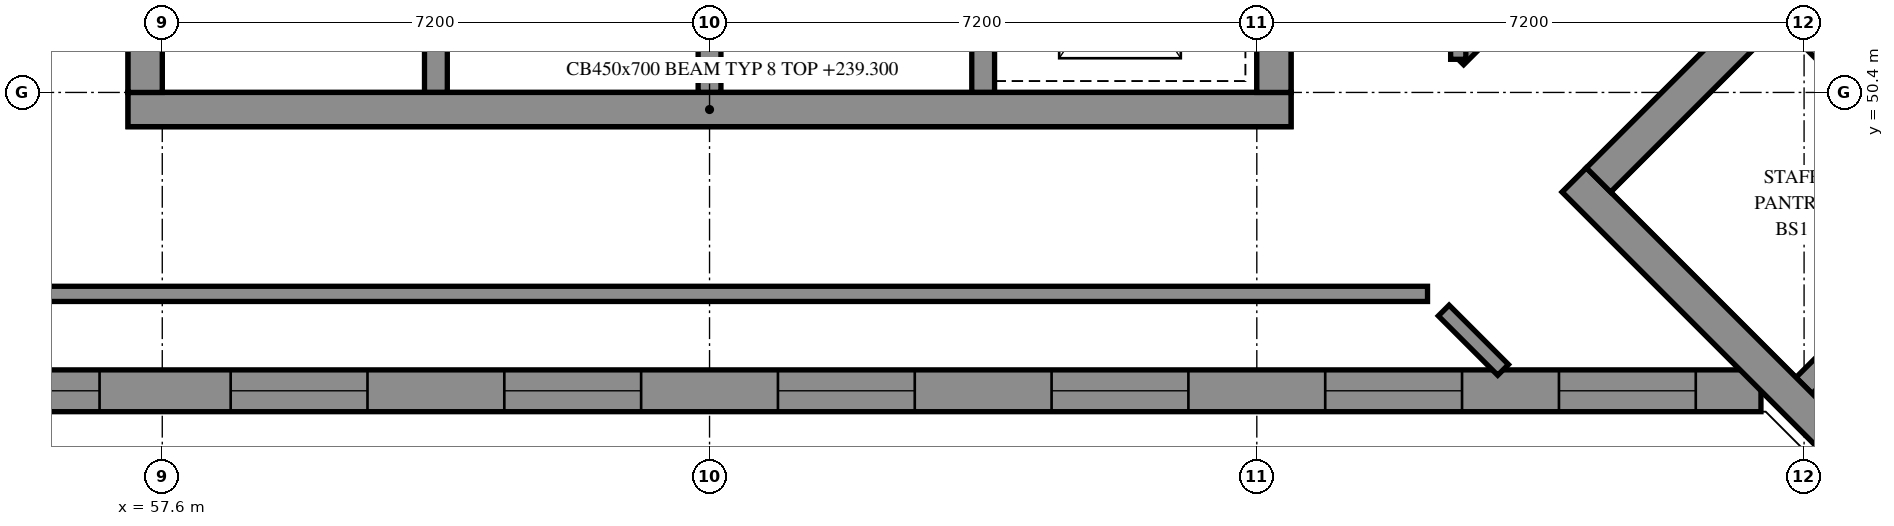
"""IFC4 building model, lengths in metres.
Left out: names, types, materials, properties, quantities, classifications, styles, units other than length and angle.
Written with IfcOpenShell. Run it as: python <this file> out.ifc"""

import sys

from ifc_helpers import new_model, si_unit, direction, frame, frame_2d, origin, place, context, subcontext, project, spatial, polyline, rectangle, outline, extrude, element, fill, save


model = new_model("IFC4")
c1 = context("Model", 3, precision=1e-05, world=origin(), true_north=direction((0.0, 1.0)))
c2 = subcontext(c1, "Body", "Model", "MODEL_VIEW")
j1 = project(units=[si_unit("LENGTHUNIT", "METRE"), si_unit("PLANEANGLEUNIT", "RADIAN")], contexts=[c1])
p1 = place(None, origin())
s1 = spatial("IfcSite", under=j1, at=p1, CompositionType="ELEMENT")
p2 = place(p1, origin())
s2 = spatial("IfcBuilding", under=s1, at=p2, CompositionType="ELEMENT")
p3 = place(p2, frame((0.0, 0.0, 234.6)))
s3 = spatial("IfcBuildingStorey", under=s2, at=p3, CompositionType="ELEMENT", Elevation=234.6)
p4 = place(p3, frame((57.15, 50.175, -0.3), z_axis=(0.0, 0.0, 1.0), x_axis=(1.0, 0.0, 0.0)))
e1 = element("IfcWall", 1, at=p4, inside=s3, PredefinedType="SHEAR", context=c2, shape_type="SweptSolid", body=[
    extrude(rectangle(XDim=15.3, YDim=0.45, at=frame_2d((7.65, 0.0))), origin(), (0.0, 0.0, 1.0), 4.3),
])
p5 = place(p3, frame((57.375, 50.4, -0.3), z_axis=(0.0, 0.0, 1.0), x_axis=(0.0, 1.0, 0.0)))
e2 = element("IfcWall", 2, at=p5, inside=s3, PredefinedType="SHEAR", context=c2, shape_type="SweptSolid", body=[
    extrude(rectangle(XDim=14.4, YDim=0.45, at=frame_2d((7.2, 0.0))), origin(), (0.0, 0.0, 1.0), 4.3),
])
p6 = place(p5, frame((4.55, 0.0, 0.3)))
e3 = element("IfcOpeningElement", 3, at=p6, cuts=e2, PredefinedType="OPENING", context=c2, shape_type="SweptSolid", body=[
    extrude(rectangle(XDim=1.1, YDim=2.1, at=frame_2d((0.55, 1.05))), frame((0.0, 0.235, 0.0), z_axis=(0.0, -1.0, 0.0), x_axis=(1.0, 0.0, 0.0)), (0.0, 0.0, 1.0), 0.47),
])
p7 = place(p5, frame((11.35, 0.0, 0.3)))
e4 = element("IfcOpeningElement", 4, at=p7, cuts=e2, PredefinedType="OPENING", context=c2, shape_type="SweptSolid", body=[
    extrude(rectangle(XDim=1.1, YDim=2.1, at=frame_2d((0.55, 1.05))), frame((0.0, 0.235, 0.0), z_axis=(0.0, -1.0, 0.0), x_axis=(1.0, 0.0, 0.0)), (0.0, 0.0, 1.0), 0.47),
])
p8 = place(p3, frame((72.225, 50.4, -0.3), z_axis=(0.0, 0.0, 1.0), x_axis=(0.0, 1.0, 0.0)))
e5 = element("IfcWall", 5, at=p8, inside=s3, PredefinedType="SHEAR", context=c2, shape_type="SweptSolid", body=[
    extrude(rectangle(XDim=14.4, YDim=0.45, at=frame_2d((7.2, 0.0))), origin(), (0.0, 0.0, 1.0), 4.3),
])
p9 = place(p8, frame((4.55, 0.0, 0.3)))
e6 = element("IfcOpeningElement", 6, at=p9, cuts=e5, PredefinedType="OPENING", context=c2, shape_type="SweptSolid", body=[
    extrude(rectangle(XDim=1.1, YDim=2.1, at=frame_2d((0.55, 1.05))), frame((0.0, 0.235, 0.0), z_axis=(0.0, -1.0, 0.0), x_axis=(1.0, 0.0, 0.0)), (0.0, 0.0, 1.0), 0.47),
])
p10 = place(p8, frame((11.35, 0.0, 0.3)))
e7 = element("IfcOpeningElement", 7, at=p10, cuts=e5, PredefinedType="OPENING", context=c2, shape_type="SweptSolid", body=[
    extrude(rectangle(XDim=1.1, YDim=2.1, at=frame_2d((0.55, 1.05))), frame((0.0, 0.235, 0.0), z_axis=(0.0, -1.0, 0.0), x_axis=(1.0, 0.0, 0.0)), (0.0, 0.0, 1.0), 0.47),
])
for number, where, z_axis, x_axis in (
    (8, (61.2, 50.4, 0.0), (0.0, 0.0, 1.0), (0.0, 1.0, 0.0)),
    (9, (64.8, 50.4, 0.0), (0.0, 0.0, 1.0), (0.0, 1.0, 0.0)),
    (10, (68.4, 50.4, 0.0), (0.0, 0.0, 1.0), (0.0, 1.0, 0.0)),
):
    element("IfcWall", number, at=place(p3, frame(where, z_axis=z_axis, x_axis=x_axis)), inside=s3, PredefinedType="SOLIDWALL", context=c2, shape_type="SweptSolid", body=[
        extrude(rectangle(XDim=3.3, YDim=0.3, at=frame_2d((1.65, 0.0))), origin(), (0.0, 0.0, 1.0), 4.7),
    ])
p11 = place(p3, frame((76.177, 49.249, -0.3), z_axis=(0.0, 0.0, 1.0), x_axis=(0.7071100491, -0.7071035132, 0.0)))
e11 = element("IfcWall", 11, at=p11, inside=s3, PredefinedType="SHEAR", context=c2, shape_type="SweptSolid", body=[
    extrude(rectangle(XDim=15.3, YDim=0.45, at=frame_2d((7.65, 0.0))), origin(), (0.0, 0.0, 1.0), 4.3),
])
p12 = place(p3, frame((76.495, 49.249, -0.3), z_axis=(0.0, 0.0, 1.0), x_axis=(0.7071067812, 0.7071067812, 0.0)))
e12 = element("IfcWall", 12, at=p12, inside=s3, PredefinedType="SHEAR", context=c2, shape_type="SweptSolid", body=[
    extrude(rectangle(XDim=14.4, YDim=0.45, at=frame_2d((7.2, 0.0))), origin(), (0.0, 0.0, 1.0), 4.3),
])
p13 = place(p12, frame((4.55, 0.0, 0.3)))
e13 = element("IfcOpeningElement", 13, at=p13, cuts=e12, PredefinedType="OPENING", context=c2, shape_type="SweptSolid", body=[
    extrude(rectangle(XDim=1.1, YDim=2.1, at=frame_2d((0.55, 1.05))), frame((0.0, 0.235, 0.0), z_axis=(0.0, -1.0, 0.0), x_axis=(1.0, 0.0, 0.0)), (0.0, 0.0, 1.0), 0.47),
])
p14 = place(p12, frame((11.35, 0.0, 0.3)))
e14 = element("IfcOpeningElement", 14, at=p14, cuts=e12, PredefinedType="OPENING", context=c2, shape_type="SweptSolid", body=[
    extrude(rectangle(XDim=1.1, YDim=2.1, at=frame_2d((0.55, 1.05))), frame((0.0, 0.235, 0.0), z_axis=(0.0, -1.0, 0.0), x_axis=(1.0, 0.0, 0.0)), (0.0, 0.0, 1.0), 0.47),
])
p15 = place(p3, frame((79.2, 46.544, 0.0), z_axis=(0.0, 0.0, 1.0), x_axis=(0.7071219326, 0.7070916295, 0.0)))
e15 = element("IfcWall", 15, at=p15, inside=s3, PredefinedType="SOLIDWALL", context=c2, shape_type="SweptSolid", body=[
    extrude(rectangle(XDim=3.3, YDim=0.3, at=frame_2d((1.65, 0.0))), origin(), (0.0, 0.0, 1.0), 4.7),
])
p16 = place(p3, frame((78.988, 51.423, 0.0), z_axis=(0.0, 0.0, 1.0), x_axis=(0.7071067812, -0.7071067812, 0.0)))
e16 = element("IfcWall", 16, at=p16, inside=s3, PredefinedType="SOLIDWALL", context=c2, shape_type="SweptSolid", body=[
    extrude(rectangle(XDim=14.4, YDim=0.3, at=frame_2d((7.2, 0.0))), origin(), (0.0, 0.0, 1.0), 4.7),
])
p17 = place(p16, frame((1.35, 0.0, 0.0)))
e17 = element("IfcOpeningElement", 17, at=p17, cuts=e16, PredefinedType="OPENING", context=c2, shape_type="SweptSolid", body=[
    extrude(rectangle(XDim=0.9, YDim=2.1, at=frame_2d((0.45, 1.05))), frame((0.0, 0.16, 0.0), z_axis=(0.0, -1.0, 0.0), x_axis=(1.0, 0.0, 0.0)), (0.0, 0.0, 1.0), 0.32),
])
p18 = place(p16, frame((4.95, 0.0, 0.0)))
e18 = element("IfcOpeningElement", 18, at=p18, cuts=e16, PredefinedType="OPENING", context=c2, shape_type="SweptSolid", body=[
    extrude(rectangle(XDim=0.9, YDim=2.1, at=frame_2d((0.45, 1.05))), frame((0.0, 0.16, 0.0), z_axis=(0.0, -1.0, 0.0), x_axis=(1.0, 0.0, 0.0)), (0.0, 0.0, 1.0), 0.32),
])
p19 = place(p16, frame((8.55, 0.0, 0.0)))
e19 = element("IfcOpeningElement", 19, at=p19, cuts=e16, PredefinedType="OPENING", context=c2, shape_type="SweptSolid", body=[
    extrude(rectangle(XDim=0.9, YDim=2.1, at=frame_2d((0.45, 1.05))), frame((0.0, 0.16, 0.0), z_axis=(0.0, -1.0, 0.0), x_axis=(1.0, 0.0, 0.0)), (0.0, 0.0, 1.0), 0.32),
])
p20 = place(p16, frame((12.05, 0.0, 0.0)))
e20 = element("IfcOpeningElement", 20, at=p20, cuts=e16, PredefinedType="OPENING", context=c2, shape_type="SweptSolid", body=[
    extrude(rectangle(XDim=1.1, YDim=2.1, at=frame_2d((0.55, 1.05))), frame((0.0, 0.16, 0.0), z_axis=(0.0, -1.0, 0.0), x_axis=(1.0, 0.0, 0.0)), (0.0, 0.0, 1.0), 0.32),
])
p21 = place(p3, frame((53.675, 46.475, 0.0), z_axis=(0.0, 0.0, 1.0), x_axis=(1.0, 0.0, 0.0)))
e21 = element("IfcWall", 21, at=p21, inside=s3, PredefinedType="SOLIDWALL", context=c2, shape_type="SweptSolid", body=[
    extrude(outline(polyline([(-0.275, -0.275), (24.958, -0.275), (24.958, 0.275), (0.275, 0.275), (-0.275, -0.275)])), origin(), (0.0, 0.0, 1.0), 4.7),
])
p22 = place(p21, frame((1.3, 0.0, 0.9)))
e22 = element("IfcOpeningElement", 22, at=p22, cuts=e21, PredefinedType="OPENING", context=c2, shape_type="SweptSolid", body=[
    extrude(rectangle(XDim=1.8, YDim=3.6, at=frame_2d((0.9, 1.8))), frame((0.0, 0.285, 0.0), z_axis=(0.0, -1.0, 0.0), x_axis=(1.0, 0.0, 0.0)), (0.0, 0.0, 1.0), 0.57),
])
p23 = place(p21, frame((4.825, 0.0, 0.9)))
e23 = element("IfcOpeningElement", 23, at=p23, cuts=e21, PredefinedType="OPENING", context=c2, shape_type="SweptSolid", body=[
    extrude(rectangle(XDim=1.8, YDim=3.6, at=frame_2d((0.9, 1.8))), frame((0.0, 0.285, 0.0), z_axis=(0.0, -1.0, 0.0), x_axis=(1.0, 0.0, 0.0)), (0.0, 0.0, 1.0), 0.57),
])
p24 = place(p21, frame((8.425, 0.0, 0.9)))
e24 = element("IfcOpeningElement", 24, at=p24, cuts=e21, PredefinedType="OPENING", context=c2, shape_type="SweptSolid", body=[
    extrude(rectangle(XDim=1.8, YDim=3.6, at=frame_2d((0.9, 1.8))), frame((0.0, 0.285, 0.0), z_axis=(0.0, -1.0, 0.0), x_axis=(1.0, 0.0, 0.0)), (0.0, 0.0, 1.0), 0.57),
])
p25 = place(p21, frame((12.025, 0.0, 0.9)))
e25 = element("IfcOpeningElement", 25, at=p25, cuts=e21, PredefinedType="OPENING", context=c2, shape_type="SweptSolid", body=[
    extrude(rectangle(XDim=1.8, YDim=3.6, at=frame_2d((0.9, 1.8))), frame((0.0, 0.285, 0.0), z_axis=(0.0, -1.0, 0.0), x_axis=(1.0, 0.0, 0.0)), (0.0, 0.0, 1.0), 0.57),
])
p26 = place(p21, frame((15.625, 0.0, 0.9)))
e26 = element("IfcOpeningElement", 26, at=p26, cuts=e21, PredefinedType="OPENING", context=c2, shape_type="SweptSolid", body=[
    extrude(rectangle(XDim=1.8, YDim=3.6, at=frame_2d((0.9, 1.8))), frame((0.0, 0.285, 0.0), z_axis=(0.0, -1.0, 0.0), x_axis=(1.0, 0.0, 0.0)), (0.0, 0.0, 1.0), 0.57),
])
p27 = place(p21, frame((19.225, 0.0, 0.9)))
e27 = element("IfcOpeningElement", 27, at=p27, cuts=e21, PredefinedType="OPENING", context=c2, shape_type="SweptSolid", body=[
    extrude(rectangle(XDim=1.8, YDim=3.6, at=frame_2d((0.9, 1.8))), frame((0.0, 0.285, 0.0), z_axis=(0.0, -1.0, 0.0), x_axis=(1.0, 0.0, 0.0)), (0.0, 0.0, 1.0), 0.57),
])
p28 = place(p21, frame((22.3, 0.0, 0.9)))
e28 = element("IfcOpeningElement", 28, at=p28, cuts=e21, PredefinedType="OPENING", context=c2, shape_type="SweptSolid", body=[
    extrude(rectangle(XDim=1.8, YDim=3.6, at=frame_2d((0.9, 1.8))), frame((0.0, 0.285, 0.0), z_axis=(0.0, -1.0, 0.0), x_axis=(1.0, 0.0, 0.0)), (0.0, 0.0, 1.0), 0.57),
])
p29 = place(p3, frame((54.95, 47.75, 0.0), z_axis=(0.0, 0.0, 1.0), x_axis=(1.0, 0.0, 0.0)))
e29 = element("IfcWall", 29, at=p29, inside=s3, PredefinedType="PARTITIONING", context=c2, shape_type="SweptSolid", body=[
    extrude(rectangle(XDim=19.296, YDim=0.2, at=frame_2d((9.648, 0.0))), origin(), (0.0, 0.0, 1.0), 4.7),
])
p30 = place(p3, frame((74.651, 50.835, 0.0), z_axis=(0.0, 0.0, 1.0), x_axis=(0.7071067812, 0.7071067812, 0.0)))
e30 = element("IfcWall", 30, at=p30, inside=s3, PredefinedType="PARTITIONING", context=c2, shape_type="SweptSolid", body=[
    extrude(rectangle(XDim=2.919, YDim=0.2, at=frame_2d((1.459, 0.0))), origin(), (0.0, 0.0, 1.0), 4.7),
])
p31 = place(p3, frame((74.65, 50.836, 0.0), z_axis=(0.0, 0.0, 1.0), x_axis=(0.0, 1.0, 0.0)))
e31 = element("IfcWall", 31, at=p31, inside=s3, PredefinedType="PARTITIONING", context=c2, shape_type="SweptSolid", body=[
    extrude(rectangle(XDim=2.064, YDim=0.2, at=frame_2d((1.032, 0.0))), origin(), (0.0, 0.0, 1.0), 4.7),
])
p32 = place(p3, frame((74.459, 47.531, 0.0), z_axis=(0.0, 0.0, 1.0), x_axis=(0.7071520462, -0.7070615133, 0.0)))
e32 = element("IfcWall", 32, at=p32, inside=s3, PredefinedType="PARTITIONING", context=c2, shape_type="SweptSolid", body=[
    extrude(rectangle(XDim=1.105, YDim=0.2, at=frame_2d((0.552, 0.0))), origin(), (0.0, 0.0, 1.0), 4.7),
])
p33 = place(p22, origin())
e33 = element("IfcWindow", 33, at=p33, inside=s3, PartitioningType="SINGLE_PANEL", PredefinedType="WINDOW", context=c2, shape_type="SweptSolid", body=[
    extrude(rectangle(XDim=1.8, YDim=3.6, at=frame_2d((0.9, 1.8))), frame((0.0, 0.155, 0.0), z_axis=(0.0, -1.0, 0.0), x_axis=(1.0, 0.0, 0.0)), (0.0, 0.0, 1.0), 0.06),
])
fill(e22, e33)
p34 = place(p23, origin())
e34 = element("IfcWindow", 34, at=p34, inside=s3, PartitioningType="SINGLE_PANEL", PredefinedType="WINDOW", context=c2, shape_type="SweptSolid", body=[
    extrude(rectangle(XDim=1.8, YDim=3.6, at=frame_2d((0.9, 1.8))), frame((0.0, 0.155, 0.0), z_axis=(0.0, -1.0, 0.0), x_axis=(1.0, 0.0, 0.0)), (0.0, 0.0, 1.0), 0.06),
])
fill(e23, e34)
p35 = place(p24, origin())
e35 = element("IfcWindow", 35, at=p35, inside=s3, PartitioningType="SINGLE_PANEL", PredefinedType="WINDOW", context=c2, shape_type="SweptSolid", body=[
    extrude(rectangle(XDim=1.8, YDim=3.6, at=frame_2d((0.9, 1.8))), frame((0.0, 0.155, 0.0), z_axis=(0.0, -1.0, 0.0), x_axis=(1.0, 0.0, 0.0)), (0.0, 0.0, 1.0), 0.06),
])
fill(e24, e35)
p36 = place(p25, origin())
e36 = element("IfcWindow", 36, at=p36, inside=s3, PartitioningType="SINGLE_PANEL", PredefinedType="WINDOW", context=c2, shape_type="SweptSolid", body=[
    extrude(rectangle(XDim=1.8, YDim=3.6, at=frame_2d((0.9, 1.8))), frame((0.0, 0.155, 0.0), z_axis=(0.0, -1.0, 0.0), x_axis=(1.0, 0.0, 0.0)), (0.0, 0.0, 1.0), 0.06),
])
fill(e25, e36)
p37 = place(p26, origin())
e37 = element("IfcWindow", 37, at=p37, inside=s3, PartitioningType="SINGLE_PANEL", PredefinedType="WINDOW", context=c2, shape_type="SweptSolid", body=[
    extrude(rectangle(XDim=1.8, YDim=3.6, at=frame_2d((0.9, 1.8))), frame((0.0, 0.155, 0.0), z_axis=(0.0, -1.0, 0.0), x_axis=(1.0, 0.0, 0.0)), (0.0, 0.0, 1.0), 0.06),
])
fill(e26, e37)
p38 = place(p27, origin())
e38 = element("IfcWindow", 38, at=p38, inside=s3, PartitioningType="SINGLE_PANEL", PredefinedType="WINDOW", context=c2, shape_type="SweptSolid", body=[
    extrude(rectangle(XDim=1.8, YDim=3.6, at=frame_2d((0.9, 1.8))), frame((0.0, 0.155, 0.0), z_axis=(0.0, -1.0, 0.0), x_axis=(1.0, 0.0, 0.0)), (0.0, 0.0, 1.0), 0.06),
])
fill(e27, e38)
p39 = place(p28, origin())
e39 = element("IfcWindow", 39, at=p39, inside=s3, PartitioningType="SINGLE_PANEL", PredefinedType="WINDOW", context=c2, shape_type="SweptSolid", body=[
    extrude(rectangle(XDim=1.8, YDim=3.6, at=frame_2d((0.9, 1.8))), frame((0.0, 0.155, 0.0), z_axis=(0.0, -1.0, 0.0), x_axis=(1.0, 0.0, 0.0)), (0.0, 0.0, 1.0), 0.06),
])
fill(e28, e39)
save(model, sys.argv[1])
